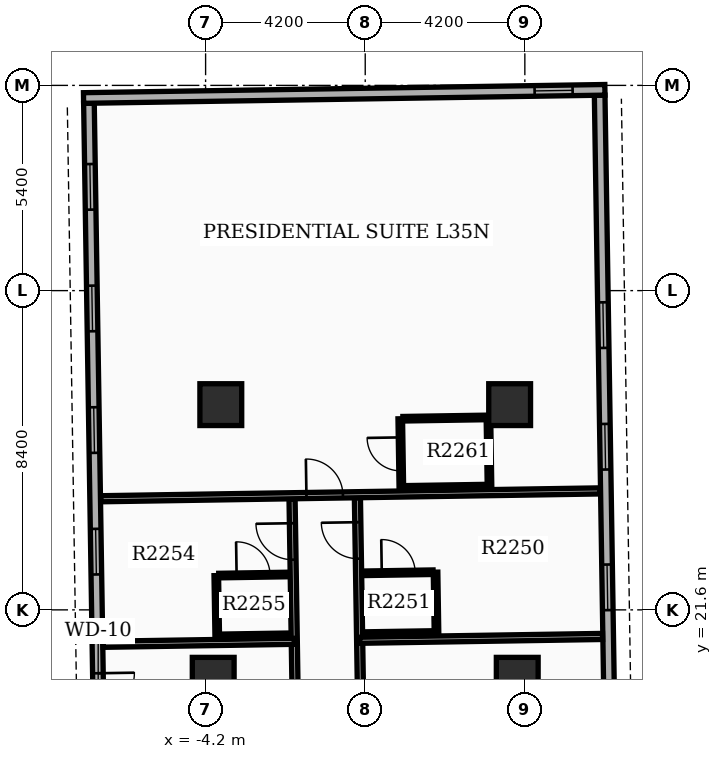
"""IFC4 building model, lengths in metres.
Left out: names, types, materials, properties, quantities, classifications, styles, units other than length and angle.
Written with IfcOpenShell. Run it as: python <this file> out.ifc"""

import sys

from ifc_helpers import new_model, si_unit, direction, frame, frame_2d, origin, origin_2d, place, context, subcontext, project, spatial, rectangle, extrude, element, fill, save


model = new_model("IFC4")
c1 = context("Model", 3, precision=1e-05, world=origin(), true_north=direction((0.0, 1.0)))
c2 = subcontext(c1, "Body", "Model", "MODEL_VIEW")
j1 = project(units=[si_unit("LENGTHUNIT", "METRE"), si_unit("PLANEANGLEUNIT", "RADIAN")], contexts=[c1])
p1 = place(None, origin())
s1 = spatial("IfcSite", under=j1, at=p1, CompositionType="ELEMENT")
p2 = place(p1, origin())
s2 = spatial("IfcBuilding", under=s1, at=p2, CompositionType="ELEMENT")
p3 = place(p2, frame((0.0, 0.0, 139.8)))
s3 = spatial("IfcBuildingStorey", under=s2, at=p3, CompositionType="ELEMENT", Elevation=139.8)
for number, where, z_axis, x_axis in (
    (1, (-4.0, 19.8, 0.0), (0.0, 0.0, 1.0), (1.0, 0.0, 0.0)),
    (2, (4.0, 19.8, 0.0), (0.0, 0.0, 1.0), (1.0, 0.0, 0.0)),
    (3, (-3.8, 27.0, 0.0), (0.0, 0.0, 1.0), (1.0, 0.0, 0.0)),
    (4, (3.8, 27.0, 0.0), (0.0, 0.0, 1.0), (1.0, 0.0, 0.0)),
):
    element("IfcColumn", number, at=place(p3, frame(where, z_axis=z_axis, x_axis=x_axis)), inside=s3, PredefinedType="COLUMN", context=c2, shape_type="SweptSolid", body=[
        extrude(rectangle(XDim=1.1, YDim=1.1, at=origin_2d()), origin(), (0.0, 0.0, 1.0), 3.9),
    ])
p4 = place(p3, frame((6.485, 15.044, 0.0), z_axis=(0.0, 0.0, 1.0), x_axis=(-0.01571739401, 0.999876474133, 0.0)))
e5 = element("IfcWall", 5, at=p4, inside=s3, PredefinedType="STANDARD", context=c2, shape_type="SweptSolid", body=[
    extrude(rectangle(XDim=20.1, YDim=0.28, at=frame_2d((10.05, 0.0))), origin(), (0.0, 0.0, 1.0), 2.92),
])
p5 = place(p4, frame((1.6, 0.0, 0.8)))
e6 = element("IfcOpeningElement", 6, at=p5, cuts=e5, PredefinedType="OPENING", context=c2, shape_type="SweptSolid", body=[
    extrude(rectangle(XDim=1.2, YDim=1.6, at=frame_2d((0.6, 0.8))), frame((0.0, 0.15, 0.0), z_axis=(0.0, -1.0, 0.0), x_axis=(1.0, 0.0, 0.0)), (0.0, 0.0, 1.0), 0.3),
])
p6 = place(p4, frame((6.55, 0.0, 0.8)))
e7 = element("IfcOpeningElement", 7, at=p6, cuts=e5, PredefinedType="OPENING", context=c2, shape_type="SweptSolid", body=[
    extrude(rectangle(XDim=1.2, YDim=1.6, at=frame_2d((0.6, 0.8))), frame((0.0, 0.15, 0.0), z_axis=(0.0, -1.0, 0.0), x_axis=(1.0, 0.0, 0.0)), (0.0, 0.0, 1.0), 0.3),
])
p7 = place(p4, frame((10.25, 0.0, 0.8)))
e8 = element("IfcOpeningElement", 8, at=p7, cuts=e5, PredefinedType="OPENING", context=c2, shape_type="SweptSolid", body=[
    extrude(rectangle(XDim=1.2, YDim=1.6, at=frame_2d((0.6, 0.8))), frame((0.0, 0.15, 0.0), z_axis=(0.0, -1.0, 0.0), x_axis=(1.0, 0.0, 0.0)), (0.0, 0.0, 1.0), 0.3),
])
p8 = place(p4, frame((13.45, 0.0, 0.8)))
e9 = element("IfcOpeningElement", 9, at=p8, cuts=e5, PredefinedType="OPENING", context=c2, shape_type="SweptSolid", body=[
    extrude(rectangle(XDim=1.2, YDim=1.6, at=frame_2d((0.6, 0.8))), frame((0.0, 0.15, 0.0), z_axis=(0.0, -1.0, 0.0), x_axis=(1.0, 0.0, 0.0)), (0.0, 0.0, 1.0), 0.3),
])
p9 = place(p3, frame((-7.27, 34.93, 0.0), z_axis=(0.0, 0.0, 1.0), x_axis=(0.015705059908, -0.999876667941, 0.0)))
e10 = element("IfcWall", 10, at=p9, inside=s3, PredefinedType="STANDARD", context=c2, shape_type="SweptSolid", body=[
    extrude(rectangle(XDim=20.1, YDim=0.28, at=frame_2d((10.05, 0.0))), origin(), (0.0, 0.0, 1.0), 2.92),
])
p10 = place(p9, frame((1.6, 0.0, 0.8)))
e11 = element("IfcOpeningElement", 11, at=p10, cuts=e10, PredefinedType="OPENING", context=c2, shape_type="SweptSolid", body=[
    extrude(rectangle(XDim=1.2, YDim=1.6, at=frame_2d((0.6, 0.8))), frame((0.0, 0.15, 0.0), z_axis=(0.0, -1.0, 0.0), x_axis=(1.0, 0.0, 0.0)), (0.0, 0.0, 1.0), 0.3),
])
p11 = place(p9, frame((4.8, 0.0, 0.8)))
e12 = element("IfcOpeningElement", 12, at=p11, cuts=e10, PredefinedType="OPENING", context=c2, shape_type="SweptSolid", body=[
    extrude(rectangle(XDim=1.2, YDim=1.6, at=frame_2d((0.6, 0.8))), frame((0.0, 0.15, 0.0), z_axis=(0.0, -1.0, 0.0), x_axis=(1.0, 0.0, 0.0)), (0.0, 0.0, 1.0), 0.3),
])
p12 = place(p9, frame((8.0, 0.0, 0.8)))
e13 = element("IfcOpeningElement", 13, at=p12, cuts=e10, PredefinedType="OPENING", context=c2, shape_type="SweptSolid", body=[
    extrude(rectangle(XDim=1.2, YDim=1.6, at=frame_2d((0.6, 0.8))), frame((0.0, 0.15, 0.0), z_axis=(0.0, -1.0, 0.0), x_axis=(1.0, 0.0, 0.0)), (0.0, 0.0, 1.0), 0.3),
])
p13 = place(p9, frame((11.2, 0.0, 0.8)))
e14 = element("IfcOpeningElement", 14, at=p13, cuts=e10, PredefinedType="OPENING", context=c2, shape_type="SweptSolid", body=[
    extrude(rectangle(XDim=1.2, YDim=1.6, at=frame_2d((0.6, 0.8))), frame((0.0, 0.15, 0.0), z_axis=(0.0, -1.0, 0.0), x_axis=(1.0, 0.0, 0.0)), (0.0, 0.0, 1.0), 0.3),
])
p14 = place(p9, frame((15.0, 0.0, 0.0)))
e15 = element("IfcOpeningElement", 15, at=p14, cuts=e10, PredefinedType="OPENING", context=c2, shape_type="SweptSolid", body=[
    extrude(rectangle(XDim=0.96, YDim=2.1, at=frame_2d((0.48, 1.05))), frame((0.0, 0.15, 0.0), z_axis=(0.0, -1.0, 0.0), x_axis=(1.0, 0.0, 0.0)), (0.0, 0.0, 1.0), 0.3),
])
p15 = place(p3, frame((6.307, 35.283, 0.0), z_axis=(0.0, 0.0, 1.0), x_axis=(-0.999876549481, -0.015712599986, 0.0)))
e16 = element("IfcWall", 16, at=p15, inside=s3, PredefinedType="STANDARD", context=c2, shape_type="SweptSolid", body=[
    extrude(rectangle(XDim=13.72, YDim=0.28, at=frame_2d((6.86, 0.0))), origin(), (0.0, 0.0, 1.0), 2.92),
])
p16 = place(p15, frame((0.85, 0.0, 0.85)))
e17 = element("IfcOpeningElement", 17, at=p16, cuts=e16, PredefinedType="OPENING", context=c2, shape_type="SweptSolid", body=[
    extrude(rectangle(XDim=1.0, YDim=1.5, at=frame_2d((0.5, 0.75))), frame((0.0, 0.15, 0.0), z_axis=(0.0, -1.0, 0.0), x_axis=(1.0, 0.0, 0.0)), (0.0, 0.0, 1.0), 0.3),
])
p17 = place(p3, frame((-0.053, 14.851, 0.0), z_axis=(0.0, 0.0, 1.0), x_axis=(-0.015705659641, 0.999876658521, 0.0)))
e18 = element("IfcWall", 18, at=p17, inside=s3, PredefinedType="PARTITIONING", context=c2, shape_type="SweptSolid", body=[
    extrude(rectangle(XDim=9.7, YDim=0.16, at=frame_2d((4.85, 0.0))), origin(), (0.0, 0.0, 1.0), 2.91),
])
p18 = place(p17, frame((2.575, 0.0, 0.0)))
e19 = element("IfcOpeningElement", 19, at=p18, cuts=e18, PredefinedType="OPENING", context=c2, shape_type="SweptSolid", body=[
    extrude(rectangle(XDim=0.96, YDim=2.15, at=frame_2d((0.48, 1.075))), frame((0.0, 0.09, 0.0), z_axis=(0.0, -1.0, 0.0), x_axis=(1.0, 0.0, 0.0)), (0.0, 0.0, 1.0), 0.18),
])
p19 = place(p17, frame((8.097, 0.0, 0.0)))
e20 = element("IfcOpeningElement", 20, at=p19, cuts=e18, PredefinedType="OPENING", context=c2, shape_type="SweptSolid", body=[
    extrude(rectangle(XDim=0.96, YDim=2.15, at=frame_2d((0.48, 1.075))), frame((0.0, 0.09, 0.0), z_axis=(0.0, -1.0, 0.0), x_axis=(1.0, 0.0, 0.0)), (0.0, 0.0, 1.0), 0.18),
])
p20 = place(p3, frame((-0.147, 20.8, 0.0), z_axis=(0.0, 0.0, 1.0), x_axis=(0.999876774542, 0.015698271615, 0.0)))
e21 = element("IfcWall", 21, at=p20, inside=s3, PredefinedType="PARTITIONING", context=c2, shape_type="SweptSolid", body=[
    extrude(rectangle(XDim=6.392, YDim=0.16, at=frame_2d((3.196, 0.0))), origin(), (0.0, 0.0, 1.0), 2.91),
])
p21 = place(p3, frame((-0.034, 22.562, 0.0), z_axis=(0.0, 0.0, 1.0), x_axis=(0.999876836305, 0.015694337248, 0.0)))
e22 = element("IfcWall", 22, at=p21, inside=s3, PredefinedType="PARTITIONING", context=c2, shape_type="SweptSolid", body=[
    extrude(rectangle(XDim=1.82, YDim=0.12, at=frame_2d((0.91, 0.0))), origin(), (0.0, 0.0, 1.0), 2.91),
])
p22 = place(p21, frame((0.47, 0.0, 0.0)))
e23 = element("IfcOpeningElement", 23, at=p22, cuts=e22, PredefinedType="OPENING", context=c2, shape_type="SweptSolid", body=[
    extrude(rectangle(XDim=0.88, YDim=2.1, at=frame_2d((0.44, 1.05))), frame((0.0, 0.07, 0.0), z_axis=(0.0, -1.0, 0.0), x_axis=(1.0, 0.0, 0.0)), (0.0, 0.0, 1.0), 0.14),
])
p23 = place(p3, frame((-0.009, 20.962, 0.0), z_axis=(0.0, 0.0, 1.0), x_axis=(0.999876836305, 0.015694337248, 0.0)))
e24 = element("IfcWall", 24, at=p23, inside=s3, PredefinedType="PARTITIONING", context=c2, shape_type="SweptSolid", body=[
    extrude(rectangle(XDim=1.82, YDim=0.12, at=frame_2d((0.91, 0.0))), origin(), (0.0, 0.0, 1.0), 2.91),
])
p24 = place(p3, frame((1.875, 20.992, 0.0), z_axis=(0.0, 0.0, 1.0), x_axis=(-0.015716050513, 0.999876495251, 0.0)))
e25 = element("IfcWall", 25, at=p24, inside=s3, PredefinedType="PARTITIONING", context=c2, shape_type="SweptSolid", body=[
    extrude(rectangle(XDim=1.6, YDim=0.12, at=frame_2d((0.8, 0.0))), origin(), (0.0, 0.0, 1.0), 2.91),
])
p25 = place(p3, frame((-1.773, 14.824, 0.0), z_axis=(0.0, 0.0, 1.0), x_axis=(-0.015680496509, 0.999877053457, 0.0)))
e26 = element("IfcWall", 26, at=p25, inside=s3, PredefinedType="PARTITIONING", context=c2, shape_type="SweptSolid", body=[
    extrude(rectangle(XDim=9.7, YDim=0.16, at=frame_2d((4.85, 0.0))), origin(), (0.0, 0.0, 1.0), 2.91),
])
p26 = place(p25, frame((2.575, 0.0, 0.0)))
e27 = element("IfcOpeningElement", 27, at=p26, cuts=e26, PredefinedType="OPENING", context=c2, shape_type="SweptSolid", body=[
    extrude(rectangle(XDim=0.96, YDim=2.15, at=frame_2d((0.48, 1.075))), frame((0.0, 0.09, 0.0), z_axis=(0.0, -1.0, 0.0), x_axis=(1.0, 0.0, 0.0)), (0.0, 0.0, 1.0), 0.18),
])
p27 = place(p25, frame((8.097, 0.0, 0.0)))
e28 = element("IfcOpeningElement", 28, at=p27, cuts=e26, PredefinedType="OPENING", context=c2, shape_type="SweptSolid", body=[
    extrude(rectangle(XDim=0.96, YDim=2.15, at=frame_2d((0.48, 1.075))), frame((0.0, 0.09, 0.0), z_axis=(0.0, -1.0, 0.0), x_axis=(1.0, 0.0, 0.0)), (0.0, 0.0, 1.0), 0.18),
])
p28 = place(p3, frame((-1.866, 20.773, 0.0), z_axis=(0.0, 0.0, 1.0), x_axis=(-0.999876443474, -0.015719344349, 0.0)))
e29 = element("IfcWall", 29, at=p28, inside=s3, PredefinedType="PARTITIONING", context=c2, shape_type="SweptSolid", body=[
    extrude(rectangle(XDim=5.032, YDim=0.16, at=frame_2d((2.516, 0.0))), origin(), (0.0, 0.0, 1.0), 2.91),
])
p29 = place(p3, frame((-3.854, 22.502, 0.0), z_axis=(0.0, 0.0, 1.0), x_axis=(0.999876836305, 0.015694337248, 0.0)))
e30 = element("IfcWall", 30, at=p29, inside=s3, PredefinedType="PARTITIONING", context=c2, shape_type="SweptSolid", body=[
    extrude(rectangle(XDim=1.82, YDim=0.12, at=frame_2d((0.91, 0.0))), origin(), (0.0, 0.0, 1.0), 2.91),
])
p30 = place(p29, frame((0.47, 0.0, 0.0)))
e31 = element("IfcOpeningElement", 31, at=p30, cuts=e30, PredefinedType="OPENING", context=c2, shape_type="SweptSolid", body=[
    extrude(rectangle(XDim=0.88, YDim=2.1, at=frame_2d((0.44, 1.05))), frame((0.0, 0.07, 0.0), z_axis=(0.0, -1.0, 0.0), x_axis=(1.0, 0.0, 0.0)), (0.0, 0.0, 1.0), 0.14),
])
p31 = place(p3, frame((-3.829, 20.902, 0.0), z_axis=(0.0, 0.0, 1.0), x_axis=(0.999876836305, 0.015694337248, 0.0)))
e32 = element("IfcWall", 32, at=p31, inside=s3, PredefinedType="PARTITIONING", context=c2, shape_type="SweptSolid", body=[
    extrude(rectangle(XDim=1.82, YDim=0.12, at=frame_2d((0.91, 0.0))), origin(), (0.0, 0.0, 1.0), 2.91),
])
p32 = place(p3, frame((-3.894, 20.901, 0.0), z_axis=(0.0, 0.0, 1.0), x_axis=(-0.015716050513, 0.999876495251, 0.0)))
e33 = element("IfcWall", 33, at=p32, inside=s3, PredefinedType="PARTITIONING", context=c2, shape_type="SweptSolid", body=[
    extrude(rectangle(XDim=1.6, YDim=0.12, at=frame_2d((0.8, 0.0))), origin(), (0.0, 0.0, 1.0), 2.91),
])
p33 = place(p3, frame((-6.958, 24.524, 0.0), z_axis=(0.0, 0.0, 1.0), x_axis=(0.999876528878, 0.015713911007, 0.0)))
e34 = element("IfcWall", 34, at=p33, inside=s3, PredefinedType="PARTITIONING", context=c2, shape_type="SweptSolid", body=[
    extrude(rectangle(XDim=13.144, YDim=0.16, at=frame_2d((6.572, 0.0))), origin(), (0.0, 0.0, 1.0), 2.91),
])
p34 = place(p33, frame((5.412, 0.0, 0.0)))
e35 = element("IfcOpeningElement", 35, at=p34, cuts=e34, PredefinedType="OPENING", context=c2, shape_type="SweptSolid", body=[
    extrude(rectangle(XDim=0.96, YDim=2.15, at=frame_2d((0.48, 1.075))), frame((0.0, 0.09, 0.0), z_axis=(0.0, -1.0, 0.0), x_axis=(1.0, 0.0, 0.0)), (0.0, 0.0, 1.0), 0.18),
])
p35 = place(p3, frame((0.95, 24.808, 0.0), z_axis=(0.0, 0.0, 1.0), x_axis=(-0.015696442504, 0.999876803258, 0.0)))
e36 = element("IfcWall", 36, at=p35, inside=s3, PredefinedType="PARTITIONING", context=c2, shape_type="SweptSolid", body=[
    extrude(rectangle(XDim=1.82, YDim=0.12, at=frame_2d((0.91, 0.0))), origin(), (0.0, 0.0, 1.0), 2.91),
])
p36 = place(p35, frame((0.45, 0.0, 0.0)))
e37 = element("IfcOpeningElement", 37, at=p36, cuts=e36, PredefinedType="OPENING", context=c2, shape_type="SweptSolid", body=[
    extrude(rectangle(XDim=0.88, YDim=2.1, at=frame_2d((0.44, 1.05))), frame((0.0, 0.07, 0.0), z_axis=(0.0, -1.0, 0.0), x_axis=(1.0, 0.0, 0.0)), (0.0, 0.0, 1.0), 0.14),
])
p37 = place(p3, frame((3.27, 24.844, 0.0), z_axis=(0.0, 0.0, 1.0), x_axis=(-0.015694337248, 0.999876836305, 0.0)))
e38 = element("IfcWall", 38, at=p37, inside=s3, PredefinedType="PARTITIONING", context=c2, shape_type="SweptSolid", body=[
    extrude(rectangle(XDim=1.82, YDim=0.12, at=frame_2d((0.91, 0.0))), origin(), (0.0, 0.0, 1.0), 2.91),
])
for number, where, z_axis, x_axis in (
    (39, (1.021, 24.809, 0.0), (0.0, 0.0, 1.0), (1.0, 0.016, 0.0)),
    (40, (0.992, 26.629, 0.0), (0.0, 0.0, 1.0), (1.0, 0.016, 0.0)),
):
    element("IfcWall", number, at=place(p3, frame(where, z_axis=z_axis, x_axis=x_axis)), inside=s3, PredefinedType="PARTITIONING", context=c2, shape_type="SweptSolid", body=[
        extrude(rectangle(XDim=2.18, YDim=0.12, at=frame_2d((1.09, 0.0))), origin(), (0.0, 0.0, 1.0), 2.91),
    ])
p38 = place(p6, origin())
e41 = element("IfcWindow", 41, at=p38, inside=s3, PartitioningType="SINGLE_PANEL", PredefinedType="WINDOW", context=c2, shape_type="SweptSolid", body=[
    extrude(rectangle(XDim=1.2, YDim=1.6, at=frame_2d((0.6, 0.8))), frame((0.0, 0.03, 0.0), z_axis=(0.0, -1.0, 0.0), x_axis=(1.0, 0.0, 0.0)), (0.0, 0.0, 1.0), 0.06),
])
fill(e7, e41)
p39 = place(p7, origin())
e42 = element("IfcWindow", 42, at=p39, inside=s3, PartitioningType="SINGLE_PANEL", PredefinedType="WINDOW", context=c2, shape_type="SweptSolid", body=[
    extrude(rectangle(XDim=1.2, YDim=1.6, at=frame_2d((0.6, 0.8))), frame((0.0, 0.03, 0.0), z_axis=(0.0, -1.0, 0.0), x_axis=(1.0, 0.0, 0.0)), (0.0, 0.0, 1.0), 0.06),
])
fill(e8, e42)
p40 = place(p8, origin())
e43 = element("IfcWindow", 43, at=p40, inside=s3, PartitioningType="SINGLE_PANEL", PredefinedType="WINDOW", context=c2, shape_type="SweptSolid", body=[
    extrude(rectangle(XDim=1.2, YDim=1.6, at=frame_2d((0.6, 0.8))), frame((0.0, 0.03, 0.0), z_axis=(0.0, -1.0, 0.0), x_axis=(1.0, 0.0, 0.0)), (0.0, 0.0, 1.0), 0.06),
])
fill(e9, e43)
p41 = place(p10, origin())
e44 = element("IfcWindow", 44, at=p41, inside=s3, PartitioningType="SINGLE_PANEL", PredefinedType="WINDOW", context=c2, shape_type="SweptSolid", body=[
    extrude(rectangle(XDim=1.2, YDim=1.6, at=frame_2d((0.6, 0.8))), frame((0.0, 0.03, 0.0), z_axis=(0.0, -1.0, 0.0), x_axis=(1.0, 0.0, 0.0)), (0.0, 0.0, 1.0), 0.06),
])
fill(e11, e44)
p42 = place(p11, origin())
e45 = element("IfcWindow", 45, at=p42, inside=s3, PartitioningType="SINGLE_PANEL", PredefinedType="WINDOW", context=c2, shape_type="SweptSolid", body=[
    extrude(rectangle(XDim=1.2, YDim=1.6, at=frame_2d((0.6, 0.8))), frame((0.0, 0.03, 0.0), z_axis=(0.0, -1.0, 0.0), x_axis=(1.0, 0.0, 0.0)), (0.0, 0.0, 1.0), 0.06),
])
fill(e12, e45)
p43 = place(p12, origin())
e46 = element("IfcWindow", 46, at=p43, inside=s3, PartitioningType="SINGLE_PANEL", PredefinedType="WINDOW", context=c2, shape_type="SweptSolid", body=[
    extrude(rectangle(XDim=1.2, YDim=1.6, at=frame_2d((0.6, 0.8))), frame((0.0, 0.03, 0.0), z_axis=(0.0, -1.0, 0.0), x_axis=(1.0, 0.0, 0.0)), (0.0, 0.0, 1.0), 0.06),
])
fill(e13, e46)
p44 = place(p13, origin())
e47 = element("IfcWindow", 47, at=p44, inside=s3, PartitioningType="SINGLE_PANEL", PredefinedType="WINDOW", context=c2, shape_type="SweptSolid", body=[
    extrude(rectangle(XDim=1.2, YDim=1.6, at=frame_2d((0.6, 0.8))), frame((0.0, 0.03, 0.0), z_axis=(0.0, -1.0, 0.0), x_axis=(1.0, 0.0, 0.0)), (0.0, 0.0, 1.0), 0.06),
])
fill(e14, e47)
p45 = place(p16, origin())
e48 = element("IfcWindow", 48, at=p45, inside=s3, PartitioningType="SINGLE_PANEL", PredefinedType="WINDOW", context=c2, shape_type="SweptSolid", body=[
    extrude(rectangle(XDim=1.0, YDim=1.5, at=frame_2d((0.5, 0.75))), frame((0.0, 0.03, 0.0), z_axis=(0.0, -1.0, 0.0), x_axis=(1.0, 0.0, 0.0)), (0.0, 0.0, 1.0), 0.06),
])
fill(e17, e48)
p46 = place(p14, origin())
e49 = element("IfcDoor", 49, at=p46, inside=s3, OperationType="SINGLE_SWING_LEFT", PredefinedType="DOOR", context=c2, shape_type="SweptSolid", body=[
    extrude(rectangle(XDim=0.96, YDim=2.1, at=frame_2d((0.48, 1.05))), frame((0.0, 0.025, 0.0), z_axis=(0.0, -1.0, 0.0), x_axis=(1.0, 0.0, 0.0)), (0.0, 0.0, 1.0), 0.05),
])
fill(e15, e49)
p47 = place(p19, origin())
e50 = element("IfcDoor", 50, at=p47, inside=s3, OperationType="SINGLE_SWING_RIGHT", PredefinedType="DOOR", context=c2, shape_type="SweptSolid", body=[
    extrude(rectangle(XDim=0.96, YDim=2.15, at=frame_2d((0.48, 1.075))), frame((0.0, 0.025, 0.0), z_axis=(0.0, -1.0, 0.0), x_axis=(1.0, 0.0, 0.0)), (0.0, 0.0, 1.0), 0.05),
])
fill(e20, e50)
p48 = place(p22, origin())
e51 = element("IfcDoor", 51, at=p48, inside=s3, OperationType="SINGLE_SWING_LEFT", PredefinedType="DOOR", context=c2, shape_type="SweptSolid", body=[
    extrude(rectangle(XDim=0.88, YDim=2.1, at=frame_2d((0.44, 1.05))), frame((0.0, 0.025, 0.0), z_axis=(0.0, -1.0, 0.0), x_axis=(1.0, 0.0, 0.0)), (0.0, 0.0, 1.0), 0.05),
])
fill(e23, e51)
p49 = place(p27, origin())
e52 = element("IfcDoor", 52, at=p49, inside=s3, OperationType="SINGLE_SWING_RIGHT", PredefinedType="DOOR", context=c2, shape_type="SweptSolid", body=[
    extrude(rectangle(XDim=0.96, YDim=2.15, at=frame_2d((0.48, 1.075))), frame((0.0, 0.025, 0.0), z_axis=(0.0, -1.0, 0.0), x_axis=(1.0, 0.0, 0.0)), (0.0, 0.0, 1.0), 0.05),
])
fill(e28, e52)
p50 = place(p30, origin())
e53 = element("IfcDoor", 53, at=p50, inside=s3, OperationType="SINGLE_SWING_LEFT", PredefinedType="DOOR", context=c2, shape_type="SweptSolid", body=[
    extrude(rectangle(XDim=0.88, YDim=2.1, at=frame_2d((0.44, 1.05))), frame((0.0, 0.025, 0.0), z_axis=(0.0, -1.0, 0.0), x_axis=(1.0, 0.0, 0.0)), (0.0, 0.0, 1.0), 0.05),
])
fill(e31, e53)
p51 = place(p34, origin())
e54 = element("IfcDoor", 54, at=p51, inside=s3, OperationType="SINGLE_SWING_LEFT", PredefinedType="DOOR", context=c2, shape_type="SweptSolid", body=[
    extrude(rectangle(XDim=0.96, YDim=2.15, at=frame_2d((0.48, 1.075))), frame((0.0, 0.025, 0.0), z_axis=(0.0, -1.0, 0.0), x_axis=(1.0, 0.0, 0.0)), (0.0, 0.0, 1.0), 0.05),
])
fill(e35, e54)
p52 = place(p36, origin())
e55 = element("IfcDoor", 55, at=p52, inside=s3, OperationType="SINGLE_SWING_RIGHT", PredefinedType="DOOR", context=c2, shape_type="SweptSolid", body=[
    extrude(rectangle(XDim=0.88, YDim=2.1, at=frame_2d((0.44, 1.05))), frame((0.0, 0.025, 0.0), z_axis=(0.0, -1.0, 0.0), x_axis=(1.0, 0.0, 0.0)), (0.0, 0.0, 1.0), 0.05),
])
fill(e37, e55)
save(model, sys.argv[1])
